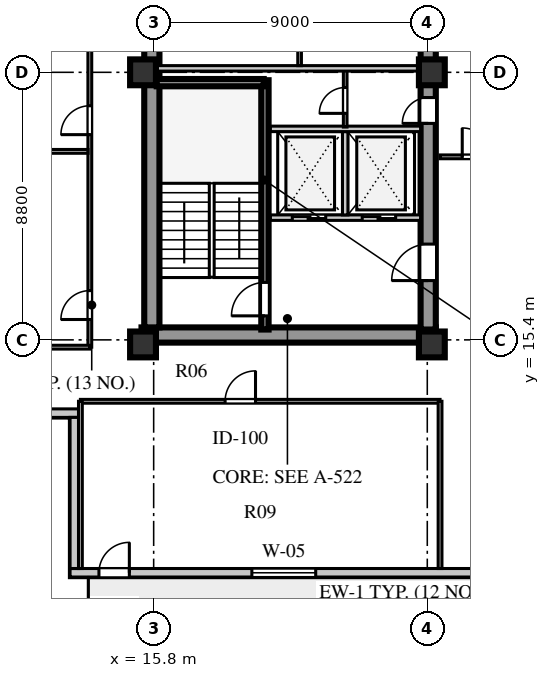
"""IFC4 building model, lengths in metres.
Left out: names, types, materials, properties, quantities, classifications, styles, units other than length and angle.
Written with IfcOpenShell. Run it as: python <this file> out.ifc"""

import sys

from ifc_helpers import new_model, si_unit, direction, frame, frame_2d, origin, origin_2d, place, context, subcontext, project, spatial, rectangle, extrude, element, fill, save


model = new_model("IFC4")
c1 = context("Model", 3, precision=1e-05, world=origin(), true_north=direction((0.0, 1.0)))
c2 = subcontext(c1, "Body", "Model", "MODEL_VIEW")
j1 = project(units=[si_unit("LENGTHUNIT", "METRE"), si_unit("PLANEANGLEUNIT", "RADIAN")], contexts=[c1])
p1 = place(None, origin())
s1 = spatial("IfcSite", under=j1, at=p1, CompositionType="ELEMENT")
p2 = place(p1, origin())
s2 = spatial("IfcBuilding", under=s1, at=p2, CompositionType="ELEMENT")
p3 = place(p2, frame((0.0, 0.0, 165.6)))
s3 = spatial("IfcBuildingStorey", under=s2, at=p3, CompositionType="ELEMENT", Elevation=165.6)
p4 = place(p3, frame((15.4, 15.56, 0.0), z_axis=(0.0, 0.0, 1.0), x_axis=(1.0, 0.0, 0.0)))
e1 = element("IfcWall", 1, at=p4, inside=s3, PredefinedType="SHEAR", context=c2, shape_type="SweptSolid", body=[
    extrude(rectangle(XDim=9.68, YDim=0.5, at=frame_2d((4.84, 0.0))), origin(), (0.0, 0.0, 1.0), 3.6),
])
p5 = place(p3, frame((15.74, 15.81, 0.0), z_axis=(0.0, 0.0, 1.0), x_axis=(0.0, 1.0, 0.0)))
e2 = element("IfcWall", 2, at=p5, inside=s3, PredefinedType="SHEAR", context=c2, shape_type="SweptSolid", body=[
    extrude(rectangle(XDim=25.63, YDim=0.5, at=frame_2d((12.815, 0.0))), origin(), (0.0, 0.0, 1.0), 3.6),
])
p6 = place(p3, frame((24.83, 15.74, 0.0), z_axis=(0.0, 0.0, 1.0), x_axis=(0.0, 1.0, 0.0)))
e3 = element("IfcWall", 3, at=p6, inside=s3, PredefinedType="SHEAR", context=c2, shape_type="SweptSolid", body=[
    extrude(rectangle(XDim=25.76, YDim=0.5, at=frame_2d((12.88, 0.0))), origin(), (0.0, 0.0, 1.0), 3.6),
])
p7 = place(p6, frame((1.61, 0.0, 0.0)))
e4 = element("IfcOpeningElement", 4, at=p7, cuts=e3, PredefinedType="OPENING", context=c2, shape_type="SweptSolid", body=[
    extrude(rectangle(XDim=1.2, YDim=2.1, at=frame_2d((0.6, 1.05))), frame((0.0, 0.26, 0.0), z_axis=(0.0, -1.0, 0.0), x_axis=(1.0, 0.0, 0.0)), (0.0, 0.0, 1.0), 0.52),
])
p8 = place(p6, frame((6.78, 0.0, 0.0)))
e5 = element("IfcOpeningElement", 5, at=p8, cuts=e3, PredefinedType="OPENING", context=c2, shape_type="SweptSolid", body=[
    extrude(rectangle(XDim=0.85, YDim=2.06, at=frame_2d((0.425, 1.03))), frame((0.0, 0.26, 0.0), z_axis=(0.0, -1.0, 0.0), x_axis=(1.0, 0.0, 0.0)), (0.0, 0.0, 1.0), 0.52),
])
p9 = place(p6, frame((12.11, 0.0, 0.0)))
e6 = element("IfcOpeningElement", 6, at=p9, cuts=e3, PredefinedType="OPENING", context=c2, shape_type="SweptSolid", body=[
    extrude(rectangle(XDim=1.5, YDim=2.12, at=frame_2d((0.75, 1.06))), frame((0.0, 0.26, 0.0), z_axis=(0.0, -1.0, 0.0), x_axis=(1.0, 0.0, 0.0)), (0.0, 0.0, 1.0), 0.52),
])
p10 = place(p6, frame((20.11, 0.0, 0.0)))
e7 = element("IfcOpeningElement", 7, at=p10, cuts=e3, PredefinedType="OPENING", context=c2, shape_type="SweptSolid", body=[
    extrude(rectangle(XDim=1.2, YDim=2.12, at=frame_2d((0.6, 1.06))), frame((0.0, 0.26, 0.0), z_axis=(0.0, -1.0, 0.0), x_axis=(1.0, 0.0, 0.0)), (0.0, 0.0, 1.0), 0.52),
])
p11 = place(p6, frame((24.01, 0.0, 0.0)))
e8 = element("IfcOpeningElement", 8, at=p11, cuts=e3, PredefinedType="OPENING", context=c2, shape_type="SweptSolid", body=[
    extrude(rectangle(XDim=0.95, YDim=2.1, at=frame_2d((0.475, 1.05))), frame((0.0, 0.26, 0.0), z_axis=(0.0, -1.0, 0.0), x_axis=(1.0, 0.0, 0.0)), (0.0, 0.0, 1.0), 0.52),
])
for number, where, z_axis, x_axis in (
    (9, (15.45, 15.25, 0.0), (0.0, 0.0, 1.0), (1.0, 0.0, 0.0)),
    (10, (15.45, 24.2, 0.0), (0.0, 0.0, 1.0), (1.0, 0.0, 0.0)),
    (11, (24.95, 15.25, 0.0), (0.0, 0.0, 1.0), (1.0, 0.0, 0.0)),
    (12, (24.95, 24.2, 0.0), (0.0, 0.0, 1.0), (1.0, 0.0, 0.0)),
):
    element("IfcColumn", number, at=place(p3, frame(where, z_axis=z_axis, x_axis=x_axis)), inside=s3, PredefinedType="COLUMN", context=c2, shape_type="SweptSolid", body=[
        extrude(rectangle(XDim=0.85, YDim=0.85, at=origin_2d()), origin(), (0.0, 0.0, 1.0), 3.6),
    ])
p12 = place(p3, frame((13.05, 7.74, 0.0), z_axis=(0.0, 0.0, 1.0), x_axis=(1.0, 0.0, 0.0)))
e13 = element("IfcWall", 13, at=p12, inside=s3, PredefinedType="STANDARD", context=c2, shape_type="SweptSolid", body=[
    extrude(rectangle(XDim=32.5, YDim=0.28, at=frame_2d((16.25, 0.0))), origin(), (0.0, 0.0, 1.0), 3.6),
])
p13 = place(p12, frame((0.95, 0.0, 0.0)))
e14 = element("IfcOpeningElement", 14, at=p13, cuts=e13, PredefinedType="OPENING", context=c2, shape_type="SweptSolid", body=[
    extrude(rectangle(XDim=1.0, YDim=2.05, at=frame_2d((0.5, 1.025))), frame((0.0, 0.15, 0.0), z_axis=(0.0, -1.0, 0.0), x_axis=(1.0, 0.0, 0.0)), (0.0, 0.0, 1.0), 0.3),
])
p14 = place(p12, frame((5.98, 0.0, 0.8)))
e15 = element("IfcOpeningElement", 15, at=p14, cuts=e13, PredefinedType="OPENING", context=c2, shape_type="SweptSolid", body=[
    extrude(rectangle(XDim=2.1, YDim=1.95, at=frame_2d((1.05, 0.975))), frame((0.0, 0.15, 0.0), z_axis=(0.0, -1.0, 0.0), x_axis=(1.0, 0.0, 0.0)), (0.0, 0.0, 1.0), 0.3),
])
p15 = place(p12, frame((13.72, 0.0, 0.8)))
e16 = element("IfcOpeningElement", 16, at=p15, cuts=e13, PredefinedType="OPENING", context=c2, shape_type="SweptSolid", body=[
    extrude(rectangle(XDim=1.35, YDim=1.9, at=frame_2d((0.675, 0.95))), frame((0.0, 0.15, 0.0), z_axis=(0.0, -1.0, 0.0), x_axis=(1.0, 0.0, 0.0)), (0.0, 0.0, 1.0), 0.3),
])
p16 = place(p12, frame((17.085, 0.0, 0.8)))
e17 = element("IfcOpeningElement", 17, at=p16, cuts=e13, PredefinedType="OPENING", context=c2, shape_type="SweptSolid", body=[
    extrude(rectangle(XDim=1.2, YDim=1.75, at=frame_2d((0.6, 0.875))), frame((0.0, 0.15, 0.0), z_axis=(0.0, -1.0, 0.0), x_axis=(1.0, 0.0, 0.0)), (0.0, 0.0, 1.0), 0.3),
])
p17 = place(p12, frame((21.18, 0.0, 0.8)))
e18 = element("IfcOpeningElement", 18, at=p17, cuts=e13, PredefinedType="OPENING", context=c2, shape_type="SweptSolid", body=[
    extrude(rectangle(XDim=1.95, YDim=2.0, at=frame_2d((0.975, 1.0))), frame((0.0, 0.15, 0.0), z_axis=(0.0, -1.0, 0.0), x_axis=(1.0, 0.0, 0.0)), (0.0, 0.0, 1.0), 0.3),
])
p18 = place(p12, frame((26.065, 0.0, 0.8)))
e19 = element("IfcOpeningElement", 19, at=p18, cuts=e13, PredefinedType="OPENING", context=c2, shape_type="SweptSolid", body=[
    extrude(rectangle(XDim=1.2, YDim=1.75, at=frame_2d((0.6, 0.875))), frame((0.0, 0.15, 0.0), z_axis=(0.0, -1.0, 0.0), x_axis=(1.0, 0.0, 0.0)), (0.0, 0.0, 1.0), 0.3),
])
p19 = place(p12, frame((29.18, 0.0, 0.8)))
e20 = element("IfcOpeningElement", 20, at=p19, cuts=e13, PredefinedType="OPENING", context=c2, shape_type="SweptSolid", body=[
    extrude(rectangle(XDim=1.8, YDim=2.0, at=frame_2d((0.9, 1.0))), frame((0.0, 0.15, 0.0), z_axis=(0.0, -1.0, 0.0), x_axis=(1.0, 0.0, 0.0)), (0.0, 0.0, 1.0), 0.3),
])
p20 = place(p3, frame((7.8, 12.99, 0.0), z_axis=(0.0, 0.0, 1.0), x_axis=(1.0, 0.0, 0.0)))
e21 = element("IfcWall", 21, at=p20, inside=s3, PredefinedType="STANDARD", context=c2, shape_type="SweptSolid", body=[
    extrude(rectangle(XDim=5.53, YDim=0.28, at=frame_2d((2.765, 0.0))), origin(), (0.0, 0.0, 1.0), 3.6),
])
p21 = place(p3, frame((13.19, 12.85, 0.0), z_axis=(0.0, 0.0, 1.0), x_axis=(0.0, -1.0, 0.0)))
e22 = element("IfcWall", 22, at=p21, inside=s3, PredefinedType="STANDARD", context=c2, shape_type="SweptSolid", body=[
    extrude(rectangle(XDim=4.97, YDim=0.28, at=frame_2d((2.485, 0.0))), origin(), (0.0, 0.0, 1.0), 3.6),
])
p22 = place(p3, frame((19.46, 15.74, 0.0), z_axis=(0.0, 0.0, 1.0), x_axis=(0.0, 1.0, 0.0)))
e23 = element("IfcWall", 23, at=p22, inside=s3, PredefinedType="SHEAR", context=c2, shape_type="SweptSolid", body=[
    extrude(rectangle(XDim=8.2, YDim=0.24, at=frame_2d((4.1, 0.0))), origin(), (0.0, 0.0, 1.0), 3.85),
])
p23 = place(p22, frame((0.45, 0.0, 0.0)))
e24 = element("IfcOpeningElement", 24, at=p23, cuts=e23, PredefinedType="OPENING", context=c2, shape_type="SweptSolid", body=[
    extrude(rectangle(XDim=1.1, YDim=2.1, at=frame_2d((0.55, 1.05))), frame((0.0, 0.13, 0.0), z_axis=(0.0, -1.0, 0.0), x_axis=(1.0, 0.0, 0.0)), (0.0, 0.0, 1.0), 0.26),
])
p24 = place(p3, frame((15.9, 23.86, 0.0), z_axis=(0.0, 0.0, 1.0), x_axis=(1.0, 0.0, 0.0)))
e25 = element("IfcWall", 25, at=p24, inside=s3, PredefinedType="SHEAR", context=c2, shape_type="SweptSolid", body=[
    extrude(rectangle(XDim=3.52, YDim=0.24, at=frame_2d((1.76, 0.0))), origin(), (0.0, 0.0, 1.0), 3.85),
])
p25 = place(p3, frame((19.64, 19.42, 0.0), z_axis=(0.0, 0.0, 1.0), x_axis=(1.0, 0.0, 0.0)))
e26 = element("IfcWall", 26, at=p25, inside=s3, PredefinedType="SOLIDWALL", context=c2, shape_type="SweptSolid", body=[
    extrude(rectangle(XDim=4.94, YDim=0.18, at=frame_2d((2.47, 0.0))), origin(), (0.0, 0.0, 1.0), 3.6),
])
p26 = place(p25, frame((0.72, 0.0, 0.0)))
e27 = element("IfcOpeningElement", 27, at=p26, cuts=e26, PredefinedType="OPENING", context=c2, shape_type="SweptSolid", body=[
    extrude(rectangle(XDim=1.1, YDim=2.1, at=frame_2d((0.55, 1.05))), frame((0.0, 0.1, 0.0), z_axis=(0.0, -1.0, 0.0), x_axis=(1.0, 0.0, 0.0)), (0.0, 0.0, 1.0), 0.2),
])
p27 = place(p25, frame((3.02, 0.0, 0.0)))
e28 = element("IfcOpeningElement", 28, at=p27, cuts=e26, PredefinedType="OPENING", context=c2, shape_type="SweptSolid", body=[
    extrude(rectangle(XDim=1.1, YDim=2.1, at=frame_2d((0.55, 1.05))), frame((0.0, 0.1, 0.0), z_axis=(0.0, -1.0, 0.0), x_axis=(1.0, 0.0, 0.0)), (0.0, 0.0, 1.0), 0.2),
])
p28 = place(p3, frame((22.1, 19.51, 0.0), z_axis=(0.0, 0.0, 1.0), x_axis=(0.0, 1.0, 0.0)))
e29 = element("IfcWall", 29, at=p28, inside=s3, PredefinedType="SOLIDWALL", context=c2, shape_type="SweptSolid", body=[
    extrude(rectangle(XDim=2.74, YDim=0.18, at=frame_2d((1.37, 0.0))), origin(), (0.0, 0.0, 1.0), 3.6),
])
p29 = place(p3, frame((19.64, 22.34, 0.0), z_axis=(0.0, 0.0, 1.0), x_axis=(1.0, 0.0, 0.0)))
e30 = element("IfcWall", 30, at=p29, inside=s3, PredefinedType="SOLIDWALL", context=c2, shape_type="SweptSolid", body=[
    extrude(rectangle(XDim=4.94, YDim=0.18, at=frame_2d((2.47, 0.0))), origin(), (0.0, 0.0, 1.0), 3.6),
])
p30 = place(p3, frame((22.1, 22.4, 0.0), z_axis=(0.0, 0.0, 1.0), x_axis=(0.0, 1.0, 0.0)))
e31 = element("IfcWall", 31, at=p30, inside=s3, PredefinedType="PARTITIONING", context=c2, shape_type="SweptSolid", body=[
    extrude(rectangle(XDim=1.88, YDim=0.12, at=frame_2d((0.94, 0.0))), origin(), (0.0, 0.0, 1.0), 3.6),
])
p31 = place(p30, frame((0.45, 0.0, 0.0)))
e32 = element("IfcOpeningElement", 32, at=p31, cuts=e31, PredefinedType="OPENING", context=c2, shape_type="SweptSolid", body=[
    extrude(rectangle(XDim=0.85, YDim=2.06, at=frame_2d((0.425, 1.03))), frame((0.0, 0.07, 0.0), z_axis=(0.0, -1.0, 0.0), x_axis=(1.0, 0.0, 0.0)), (0.0, 0.0, 1.0), 0.14),
])
p32 = place(p3, frame((15.9, 24.33, 0.0), z_axis=(0.0, 0.0, 1.0), x_axis=(1.0, 0.0, 0.0)))
e33 = element("IfcWall", 33, at=p32, inside=s3, PredefinedType="SOLIDWALL", context=c2, shape_type="SweptSolid", body=[
    extrude(rectangle(XDim=8.68, YDim=0.18, at=frame_2d((4.34, 0.0))), origin(), (0.0, 0.0, 1.0), 2.95),
])
p33 = place(p3, frame((20.6, 24.42, 0.0), z_axis=(0.0, 0.0, 1.0), x_axis=(0.0, 1.0, 0.0)))
e34 = element("IfcWall", 34, at=p33, inside=s3, PredefinedType="PARTITIONING", context=c2, shape_type="SweptSolid", body=[
    extrude(rectangle(XDim=2.02, YDim=0.12, at=frame_2d((1.01, 0.0))), origin(), (0.0, 0.0, 1.0), 3.6),
])
p34 = place(p3, frame((25.22, 21.42, 0.0), z_axis=(0.0, 0.0, 1.0), x_axis=(1.0, 0.0, 0.0)))
e35 = element("IfcWall", 35, at=p34, inside=s3, PredefinedType="PLUMBINGWALL", context=c2, shape_type="SweptSolid", body=[
    extrude(rectangle(XDim=15.6, YDim=0.125, at=frame_2d((7.8, 0.0))), origin(), (0.0, 0.0, 1.0), 3.25),
])
p35 = place(p34, frame((0.73, 0.0, 0.0)))
e36 = element("IfcOpeningElement", 36, at=p35, cuts=e35, PredefinedType="OPENING", context=c2, shape_type="SweptSolid", body=[
    extrude(rectangle(XDim=0.95, YDim=2.1, at=frame_2d((0.475, 1.05))), frame((0.0, 0.073, 0.0), z_axis=(0.0, -1.0, 0.0), x_axis=(1.0, 0.0, 0.0)), (0.0, 0.0, 1.0), 0.145),
])
p36 = place(p34, frame((7.23, 0.0, 0.0)))
e37 = element("IfcOpeningElement", 37, at=p36, cuts=e35, PredefinedType="OPENING", context=c2, shape_type="SweptSolid", body=[
    extrude(rectangle(XDim=0.95, YDim=2.1, at=frame_2d((0.475, 1.05))), frame((0.0, 0.073, 0.0), z_axis=(0.0, -1.0, 0.0), x_axis=(1.0, 0.0, 0.0)), (0.0, 0.0, 1.0), 0.145),
])
p37 = place(p3, frame((13.7, 15.16, 0.0), z_axis=(0.0, 0.0, 1.0), x_axis=(0.0, 1.0, 0.0)))
e38 = element("IfcWall", 38, at=p37, inside=s3, PredefinedType="PLUMBINGWALL", context=c2, shape_type="SweptSolid", body=[
    extrude(rectangle(XDim=26.88, YDim=0.125, at=frame_2d((13.44, 0.0))), origin(), (0.0, 0.0, 1.0), 3.6),
])
p38 = place(p37, frame((0.91, 0.0, 0.0)))
e39 = element("IfcOpeningElement", 39, at=p38, cuts=e38, PredefinedType="OPENING", context=c2, shape_type="SweptSolid", body=[
    extrude(rectangle(XDim=0.95, YDim=2.1, at=frame_2d((0.475, 1.05))), frame((0.0, 0.073, 0.0), z_axis=(0.0, -1.0, 0.0), x_axis=(1.0, 0.0, 0.0)), (0.0, 0.0, 1.0), 0.145),
])
p39 = place(p37, frame((6.99, 0.0, 0.0)))
e40 = element("IfcOpeningElement", 40, at=p39, cuts=e38, PredefinedType="OPENING", context=c2, shape_type="SweptSolid", body=[
    extrude(rectangle(XDim=0.95, YDim=2.1, at=frame_2d((0.475, 1.05))), frame((0.0, 0.073, 0.0), z_axis=(0.0, -1.0, 0.0), x_axis=(1.0, 0.0, 0.0)), (0.0, 0.0, 1.0), 0.145),
])
p40 = place(p37, frame((14.19, 0.0, 0.0)))
e41 = element("IfcOpeningElement", 41, at=p40, cuts=e38, PredefinedType="OPENING", context=c2, shape_type="SweptSolid", body=[
    extrude(rectangle(XDim=0.95, YDim=2.1, at=frame_2d((0.475, 1.05))), frame((0.0, 0.073, 0.0), z_axis=(0.0, -1.0, 0.0), x_axis=(1.0, 0.0, 0.0)), (0.0, 0.0, 1.0), 0.145),
])
p41 = place(p37, frame((20.79, 0.0, 0.0)))
e42 = element("IfcOpeningElement", 42, at=p41, cuts=e38, PredefinedType="OPENING", context=c2, shape_type="SweptSolid", body=[
    extrude(rectangle(XDim=0.95, YDim=2.1, at=frame_2d((0.475, 1.05))), frame((0.0, 0.073, 0.0), z_axis=(0.0, -1.0, 0.0), x_axis=(1.0, 0.0, 0.0)), (0.0, 0.0, 1.0), 0.145),
])
p42 = place(p3, frame((8.08, 15.16, 0.0), z_axis=(0.0, 0.0, 1.0), x_axis=(1.0, 0.0, 0.0)))
e43 = element("IfcWall", 43, at=p42, inside=s3, PredefinedType="PLUMBINGWALL", context=c2, shape_type="SweptSolid", body=[
    extrude(rectangle(XDim=5.62, YDim=0.125, at=frame_2d((2.81, 0.0))), origin(), (0.0, 0.0, 1.0), 3.15),
])
p43 = place(p3, frame((13.39, 13.38, 0.0), z_axis=(0.0, 0.0, 1.0), x_axis=(1.0, 0.0, 0.0)))
e44 = element("IfcWall", 44, at=p43, inside=s3, PredefinedType="PLUMBINGWALL", context=c2, shape_type="SweptSolid", body=[
    extrude(rectangle(XDim=11.83, YDim=0.125, at=frame_2d((5.915, 0.0))), origin(), (0.0, 0.0, 1.0), 3.6),
])
p44 = place(p43, frame((4.76, 0.0, 0.0)))
e45 = element("IfcOpeningElement", 45, at=p44, cuts=e44, PredefinedType="OPENING", context=c2, shape_type="SweptSolid", body=[
    extrude(rectangle(XDim=1.0, YDim=2.08, at=frame_2d((0.5, 1.04))), frame((0.0, 0.073, 0.0), z_axis=(0.0, -1.0, 0.0), x_axis=(1.0, 0.0, 0.0)), (0.0, 0.0, 1.0), 0.145),
])
p45 = place(p3, frame((13.39, 7.88, 0.0), z_axis=(0.0, 0.0, 1.0), x_axis=(0.0, 1.0, 0.0)))
e46 = element("IfcWall", 46, at=p45, inside=s3, PredefinedType="PLUMBINGWALL", context=c2, shape_type="SweptSolid", body=[
    extrude(rectangle(XDim=5.5, YDim=0.125, at=frame_2d((2.75, 0.0))), origin(), (0.0, 0.0, 1.0), 3.6),
])
p46 = place(p3, frame((25.22, 7.88, 0.0), z_axis=(0.0, 0.0, 1.0), x_axis=(0.0, 1.0, 0.0)))
e47 = element("IfcWall", 47, at=p46, inside=s3, PredefinedType="PLUMBINGWALL", context=c2, shape_type="SweptSolid", body=[
    extrude(rectangle(XDim=5.5, YDim=0.125, at=frame_2d((2.75, 0.0))), origin(), (0.0, 0.0, 1.0), 3.15),
])
p47 = place(p3, frame((8.08, 21.6, 0.0), z_axis=(0.0, 0.0, 1.0), x_axis=(1.0, 0.0, 0.0)))
e48 = element("IfcWall", 48, at=p47, inside=s3, PredefinedType="PLUMBINGWALL", context=c2, shape_type="SweptSolid", body=[
    extrude(rectangle(XDim=5.56, YDim=0.125, at=frame_2d((2.78, 0.0))), origin(), (0.0, 0.0, 1.0), 3.6),
])
p48 = place(p13, frame((1.0, 0.0, 0.0), z_axis=(0.0, 0.0, 1.0), x_axis=(-1.0, 0.0, 0.0)))
e49 = element("IfcDoor", 49, at=p48, inside=s3, OperationType="SINGLE_SWING_LEFT", PredefinedType="DOOR", context=c2, shape_type="SweptSolid", body=[
    extrude(rectangle(XDim=1.0, YDim=2.05, at=frame_2d((0.5, 1.025))), frame((0.0, 0.025, 0.0), z_axis=(0.0, -1.0, 0.0), x_axis=(1.0, 0.0, 0.0)), (0.0, 0.0, 1.0), 0.05),
])
fill(e14, e49)
p49 = place(p14, origin())
e50 = element("IfcWindow", 50, at=p49, inside=s3, PartitioningType="SINGLE_PANEL", PredefinedType="WINDOW", context=c2, shape_type="SweptSolid", body=[
    extrude(rectangle(XDim=2.1, YDim=1.95, at=frame_2d((1.05, 0.975))), frame((0.0, 0.03, 0.0), z_axis=(0.0, -1.0, 0.0), x_axis=(1.0, 0.0, 0.0)), (0.0, 0.0, 1.0), 0.06),
])
fill(e15, e50)
p50 = place(p23, origin())
e51 = element("IfcDoor", 51, at=p50, inside=s3, OperationType="SINGLE_SWING_LEFT", PredefinedType="DOOR", context=c2, shape_type="SweptSolid", body=[
    extrude(rectangle(XDim=1.1, YDim=2.1, at=frame_2d((0.55, 1.05))), frame((0.0, 0.025, 0.0), z_axis=(0.0, -1.0, 0.0), x_axis=(1.0, 0.0, 0.0)), (0.0, 0.0, 1.0), 0.05),
])
fill(e24, e51)
p51 = place(p26, origin())
e52 = element("IfcDoor", 52, at=p51, inside=s3, OperationType="DOUBLE_DOOR_SLIDING", PredefinedType="DOOR", context=c2, shape_type="SweptSolid", body=[
    extrude(rectangle(XDim=1.1, YDim=2.1, at=frame_2d((0.55, 1.05))), frame((0.0, 0.025, 0.0), z_axis=(0.0, -1.0, 0.0), x_axis=(1.0, 0.0, 0.0)), (0.0, 0.0, 1.0), 0.05),
])
fill(e27, e52)
p52 = place(p27, origin())
e53 = element("IfcDoor", 53, at=p52, inside=s3, OperationType="DOUBLE_DOOR_SLIDING", PredefinedType="DOOR", context=c2, shape_type="SweptSolid", body=[
    extrude(rectangle(XDim=1.1, YDim=2.1, at=frame_2d((0.55, 1.05))), frame((0.0, 0.025, 0.0), z_axis=(0.0, -1.0, 0.0), x_axis=(1.0, 0.0, 0.0)), (0.0, 0.0, 1.0), 0.05),
])
fill(e28, e53)
p53 = place(p7, frame((1.2, 0.0, 0.0), z_axis=(0.0, 0.0, 1.0), x_axis=(-1.0, 0.0, 0.0)))
e54 = element("IfcDoor", 54, at=p53, inside=s3, OperationType="SINGLE_SWING_RIGHT", PredefinedType="DOOR", context=c2, shape_type="SweptSolid", body=[
    extrude(rectangle(XDim=1.2, YDim=2.1, at=frame_2d((0.6, 1.05))), frame((0.0, 0.025, 0.0), z_axis=(0.0, -1.0, 0.0), x_axis=(1.0, 0.0, 0.0)), (0.0, 0.0, 1.0), 0.05),
])
fill(e4, e54)
p54 = place(p31, origin())
e55 = element("IfcDoor", 55, at=p54, inside=s3, OperationType="SINGLE_SWING_LEFT", PredefinedType="DOOR", context=c2, shape_type="SweptSolid", body=[
    extrude(rectangle(XDim=0.85, YDim=2.06, at=frame_2d((0.425, 1.03))), frame((0.0, 0.025, 0.0), z_axis=(0.0, -1.0, 0.0), x_axis=(1.0, 0.0, 0.0)), (0.0, 0.0, 1.0), 0.05),
])
fill(e32, e55)
p55 = place(p8, frame((0.85, 0.0, 0.0), z_axis=(0.0, 0.0, 1.0), x_axis=(-1.0, 0.0, 0.0)))
e56 = element("IfcDoor", 56, at=p55, inside=s3, OperationType="SINGLE_SWING_RIGHT", PredefinedType="DOOR", context=c2, shape_type="SweptSolid", body=[
    extrude(rectangle(XDim=0.85, YDim=2.06, at=frame_2d((0.425, 1.03))), frame((0.0, 0.025, 0.0), z_axis=(0.0, -1.0, 0.0), x_axis=(1.0, 0.0, 0.0)), (0.0, 0.0, 1.0), 0.05),
])
fill(e5, e56)
p56 = place(p44, frame((1.0, 0.0, 0.0), z_axis=(0.0, 0.0, 1.0), x_axis=(-1.0, 0.0, 0.0)))
e57 = element("IfcDoor", 57, at=p56, inside=s3, OperationType="SINGLE_SWING_LEFT", PredefinedType="DOOR", context=c2, shape_type="SweptSolid", body=[
    extrude(rectangle(XDim=1.0, YDim=2.08, at=frame_2d((0.5, 1.04))), frame((0.0, 0.025, 0.0), z_axis=(0.0, -1.0, 0.0), x_axis=(1.0, 0.0, 0.0)), (0.0, 0.0, 1.0), 0.05),
])
fill(e45, e57)
p57 = place(p38, origin())
e58 = element("IfcDoor", 58, at=p57, inside=s3, OperationType="SINGLE_SWING_LEFT", PredefinedType="DOOR", context=c2, shape_type="SweptSolid", body=[
    extrude(rectangle(XDim=0.95, YDim=2.1, at=frame_2d((0.475, 1.05))), frame((0.0, 0.025, 0.0), z_axis=(0.0, -1.0, 0.0), x_axis=(1.0, 0.0, 0.0)), (0.0, 0.0, 1.0), 0.05),
])
fill(e39, e58)
p58 = place(p39, origin())
e59 = element("IfcDoor", 59, at=p58, inside=s3, OperationType="SINGLE_SWING_LEFT", PredefinedType="DOOR", context=c2, shape_type="SweptSolid", body=[
    extrude(rectangle(XDim=0.95, YDim=2.1, at=frame_2d((0.475, 1.05))), frame((0.0, 0.025, 0.0), z_axis=(0.0, -1.0, 0.0), x_axis=(1.0, 0.0, 0.0)), (0.0, 0.0, 1.0), 0.05),
])
fill(e40, e59)
p59 = place(p35, frame((0.95, 0.0, 0.0), z_axis=(0.0, 0.0, 1.0), x_axis=(-1.0, 0.0, 0.0)))
e60 = element("IfcDoor", 60, at=p59, inside=s3, OperationType="SINGLE_SWING_RIGHT", PredefinedType="DOOR", context=c2, shape_type="SweptSolid", body=[
    extrude(rectangle(XDim=0.95, YDim=2.1, at=frame_2d((0.475, 1.05))), frame((0.0, 0.025, 0.0), z_axis=(0.0, -1.0, 0.0), x_axis=(1.0, 0.0, 0.0)), (0.0, 0.0, 1.0), 0.05),
])
fill(e36, e60)
save(model, sys.argv[1])
